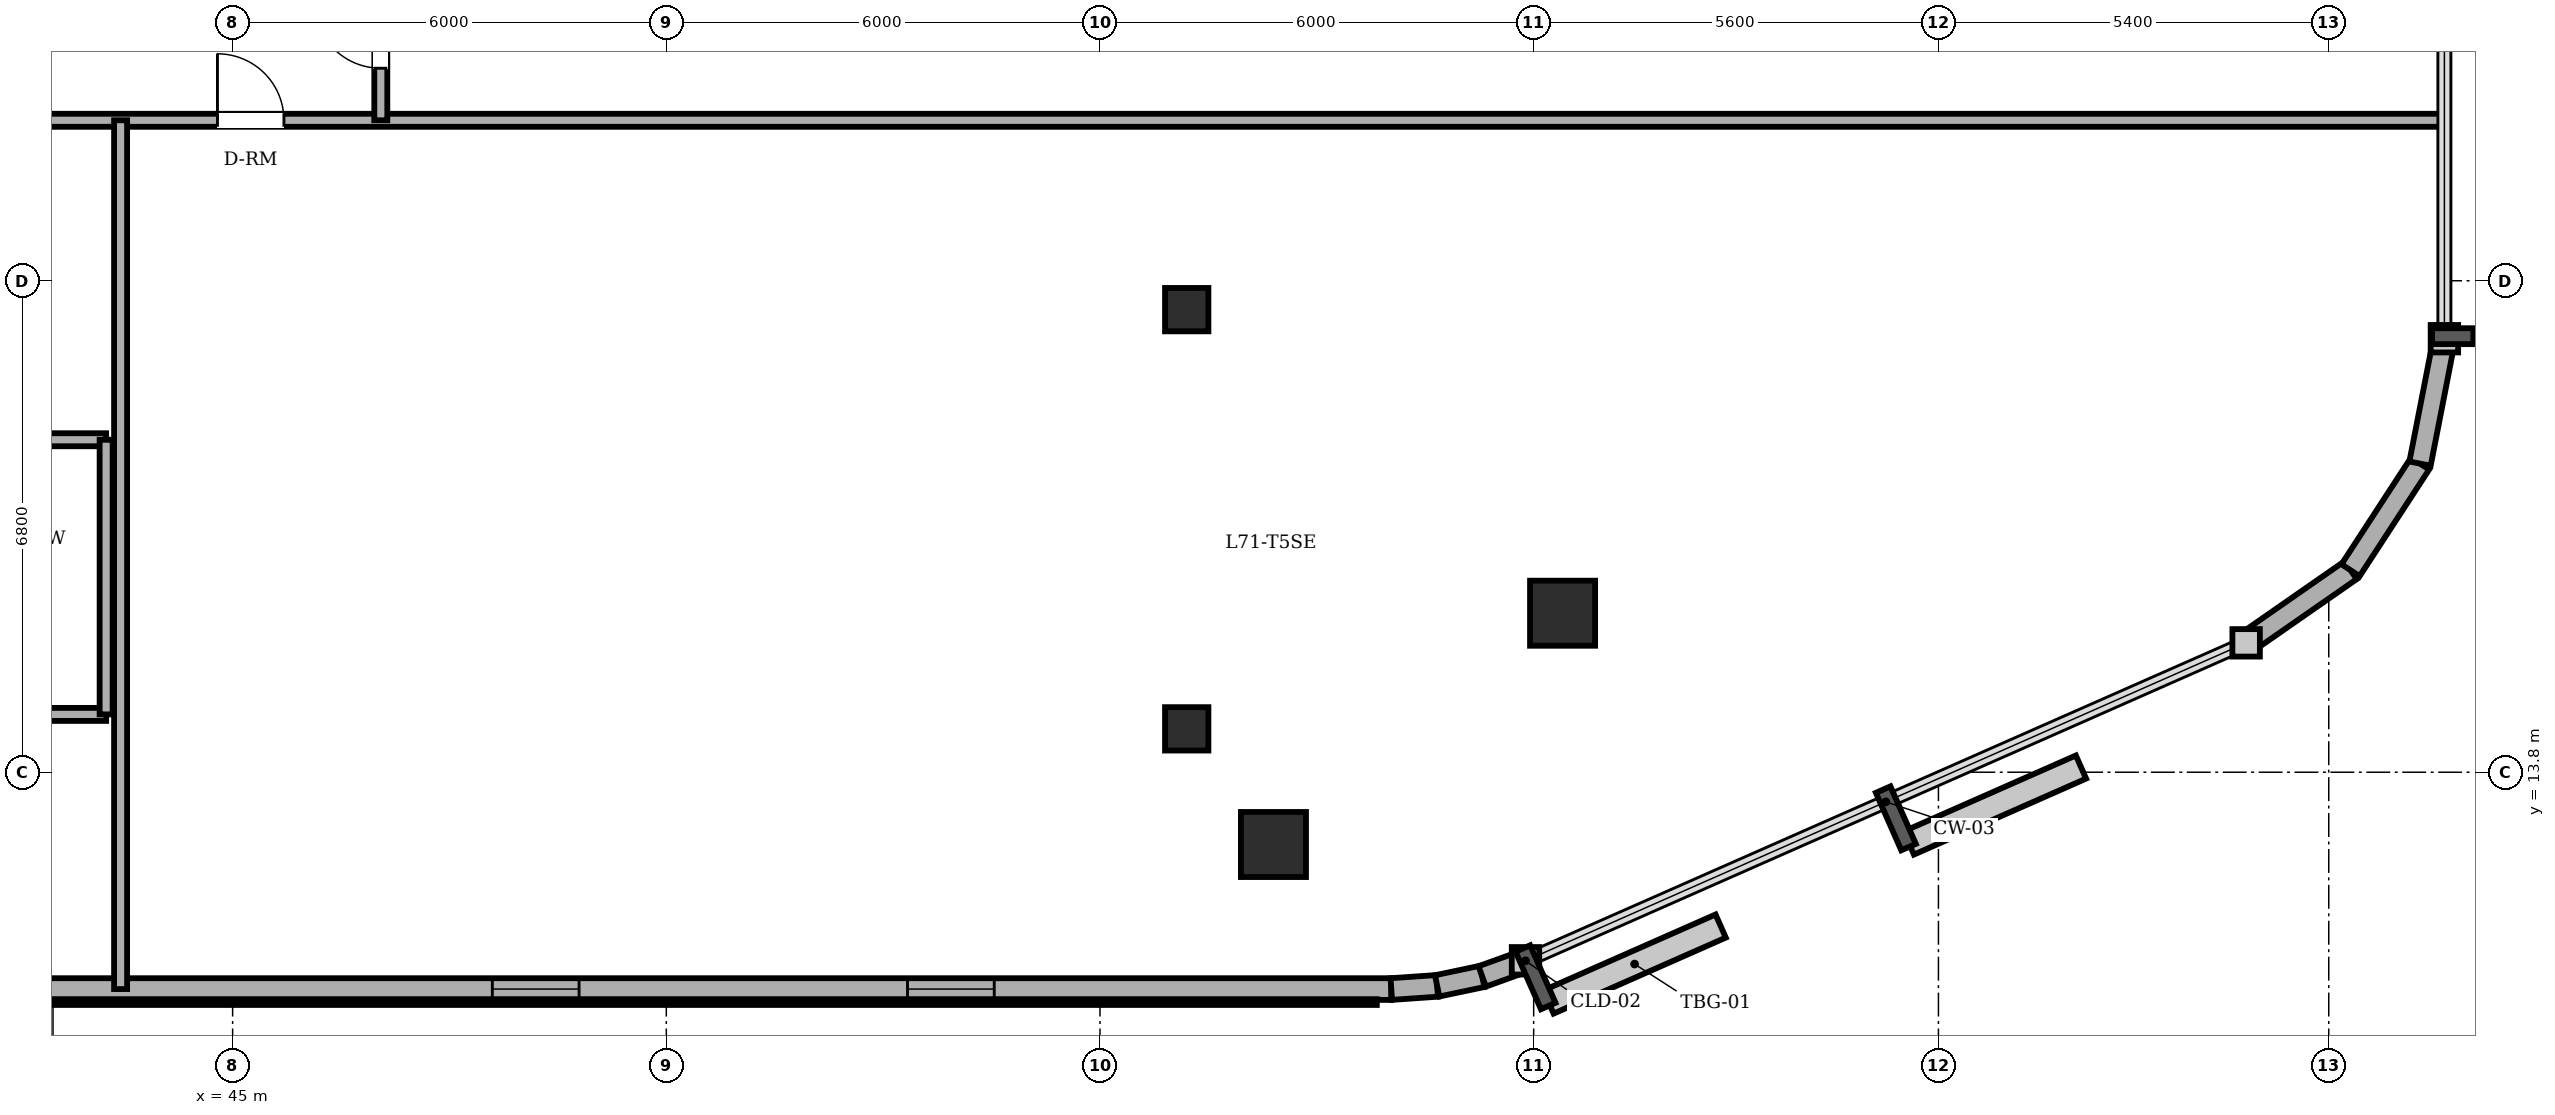
"""IFC4 building model, lengths in metres.
Left out: names, types, materials, properties, quantities, classifications, styles, units other than length and angle.
Written with IfcOpenShell. Run it as: python <this file> out.ifc"""

import sys

from ifc_helpers import new_model, si_unit, direction, frame, frame_2d, origin, origin_2d, place, context, subcontext, project, spatial, rectangle, circle, extrude, element, fill, save


model = new_model("IFC4")
c1 = context("Model", 3, precision=1e-05, world=origin(), true_north=direction((0.0, 1.0)))
c2 = subcontext(c1, "Body", "Model", "MODEL_VIEW")
j1 = project(units=[si_unit("LENGTHUNIT", "METRE"), si_unit("PLANEANGLEUNIT", "RADIAN")], contexts=[c1])
p1 = place(None, origin())
s1 = spatial("IfcSite", under=j1, at=p1, CompositionType="ELEMENT")
p2 = place(p1, origin())
s2 = spatial("IfcBuilding", under=s1, at=p2, CompositionType="ELEMENT")
p3 = place(p2, frame((0.0, 0.0, 273.4)))
s3 = spatial("IfcBuildingStorey", under=s2, at=p3, CompositionType="ELEMENT", Elevation=273.4)
for number, where, z_axis, x_axis in (
    (1, (59.4, 12.8, 0.0), (0.0, 0.0, 1.0), (1.0, 0.0, 0.0)),
    (2, (63.4, 16.0, 0.0), (0.0, 0.0, 1.0), (1.0, 0.0, 0.0)),
):
    element("IfcColumn", number, at=place(p3, frame(where, z_axis=z_axis, x_axis=x_axis)), inside=s3, PredefinedType="COLUMN", context=c2, shape_type="SweptSolid", body=[
        extrude(circle(Radius=0.45, at=origin_2d()), origin(), (0.0, 0.0, 1.0), 3.65),
    ])
for number, where, z_axis, x_axis in (
    (3, (58.2, 14.4, 0.0), (0.0, 0.0, 1.0), (1.0, 0.0, 0.0)),
    (4, (58.2, 20.2, 0.0), (0.0, 0.0, 1.0), (1.0, 0.0, 0.0)),
):
    element("IfcColumn", number, at=place(p3, frame(where, z_axis=z_axis, x_axis=x_axis)), inside=s3, PredefinedType="COLUMN", context=c2, shape_type="SweptSolid", body=[
        extrude(rectangle(XDim=0.6, YDim=0.6, at=origin_2d()), origin(), (0.0, 0.0, 1.0), 3.65),
    ])
p4 = place(p3, frame((24.0, 10.8, 0.0), z_axis=(0.0, 0.0, 1.0), x_axis=(1.0, 0.0, 0.0)))
e5 = element("IfcWall", 5, at=p4, inside=s3, PredefinedType="SOLIDWALL", context=c2, shape_type="SweptSolid", body=[
    extrude(rectangle(XDim=37.03, YDim=0.3, at=frame_2d((18.515, 0.0))), origin(), (0.0, 0.0, 1.0), 3.45),
])
p5 = place(p4, frame((5.05, 0.0, 0.0)))
e6 = element("IfcOpeningElement", 6, at=p5, cuts=e5, PredefinedType="OPENING", context=c2, shape_type="SweptSolid", body=[
    extrude(rectangle(XDim=0.95, YDim=2.2, at=frame_2d((0.475, 1.1))), frame((0.0, 0.16, 0.0), z_axis=(0.0, -1.0, 0.0), x_axis=(1.0, 0.0, 0.0)), (0.0, 0.0, 1.0), 0.32),
])
p6 = place(p4, frame((10.083, 0.0, 0.85)))
e7 = element("IfcOpeningElement", 7, at=p6, cuts=e5, PredefinedType="OPENING", context=c2, shape_type="SweptSolid", body=[
    extrude(rectangle(XDim=1.2, YDim=1.6, at=frame_2d((0.6, 0.8))), frame((0.0, 0.16, 0.0), z_axis=(0.0, -1.0, 0.0), x_axis=(1.0, 0.0, 0.0)), (0.0, 0.0, 1.0), 0.32),
])
p7 = place(p4, frame((17.05, 0.0, 0.85)))
e8 = element("IfcOpeningElement", 8, at=p7, cuts=e5, PredefinedType="OPENING", context=c2, shape_type="SweptSolid", body=[
    extrude(rectangle(XDim=1.2, YDim=1.6, at=frame_2d((0.6, 0.8))), frame((0.0, 0.16, 0.0), z_axis=(0.0, -1.0, 0.0), x_axis=(1.0, 0.0, 0.0)), (0.0, 0.0, 1.0), 0.32),
])
p8 = place(p4, frame((24.593, 0.0, 0.85)))
e9 = element("IfcOpeningElement", 9, at=p8, cuts=e5, PredefinedType="OPENING", context=c2, shape_type="SweptSolid", body=[
    extrude(rectangle(XDim=1.2, YDim=1.6, at=frame_2d((0.6, 0.8))), frame((0.0, 0.16, 0.0), z_axis=(0.0, -1.0, 0.0), x_axis=(1.0, 0.0, 0.0)), (0.0, 0.0, 1.0), 0.32),
])
p9 = place(p4, frame((30.337, 0.0, 0.85)))
e10 = element("IfcOpeningElement", 10, at=p9, cuts=e5, PredefinedType="OPENING", context=c2, shape_type="SweptSolid", body=[
    extrude(rectangle(XDim=1.2, YDim=1.6, at=frame_2d((0.6, 0.8))), frame((0.0, 0.16, 0.0), z_axis=(0.0, -1.0, 0.0), x_axis=(1.0, 0.0, 0.0)), (0.0, 0.0, 1.0), 0.32),
])
p10 = place(p3, frame((61.03, 10.8, 0.0), z_axis=(0.0, 0.0, 1.0), x_axis=(0.997613959688, 0.069039028352, 0.0)))
e11 = element("IfcWall", 11, at=p10, inside=s3, PredefinedType="SOLIDWALL", context=c2, shape_type="SweptSolid", body=[
    extrude(rectangle(XDim=0.636, YDim=0.3, at=frame_2d((0.318, 0.0))), origin(), (0.0, 0.0, 1.0), 3.45),
])
p11 = place(p3, frame((61.665, 10.844, 0.0), z_axis=(0.0, 0.0, 1.0), x_axis=(0.97857012251, 0.205913854149, 0.0)))
e12 = element("IfcWall", 12, at=p11, inside=s3, PredefinedType="SOLIDWALL", context=c2, shape_type="SweptSolid", body=[
    extrude(rectangle(XDim=0.637, YDim=0.3, at=frame_2d((0.318, 0.0))), origin(), (0.0, 0.0, 1.0), 3.45),
])
p12 = place(p3, frame((62.288, 10.975, 0.0), z_axis=(0.0, 0.0, 1.0), x_axis=(0.94077491148, 0.339031806665, 0.0)))
e13 = element("IfcWall", 13, at=p12, inside=s3, PredefinedType="SOLIDWALL", context=c2, shape_type="SweptSolid", body=[
    extrude(rectangle(XDim=0.636, YDim=0.3, at=frame_2d((0.318, 0.0))), origin(), (0.0, 0.0, 1.0), 3.45),
])
p13 = place(p3, frame((72.857, 15.59, 0.0), z_axis=(0.0, 0.0, 1.0), x_axis=(0.821006966142, 0.570918174124, 0.0)))
e14 = element("IfcWall", 14, at=p13, inside=s3, PredefinedType="SOLIDWALL", context=c2, shape_type="SweptSolid", body=[
    extrude(rectangle(XDim=1.76, YDim=0.3, at=frame_2d((0.88, 0.0))), origin(), (0.0, 0.0, 1.0), 3.45),
])
for number, where, z_axis, x_axis in (
    (15, (74.302, 16.595, 0.0), (0.0, 0.0, 1.0), (0.546, 0.838, 0.0)),
    (16, (75.263, 18.07, 0.0), (0.0, 0.0, 1.0), (0.192, 0.981, 0.0)),
):
    element("IfcWall", number, at=place(p3, frame(where, z_axis=z_axis, x_axis=x_axis)), inside=s3, PredefinedType="SOLIDWALL", context=c2, shape_type="SweptSolid", body=[
        extrude(rectangle(XDim=1.76, YDim=0.3, at=frame_2d((0.88, 0.0))), origin(), (0.0, 0.0, 1.0), 3.45),
    ])
p14 = place(p3, frame((39.85, 14.6, 0.0), z_axis=(0.0, 0.0, 1.0), x_axis=(1.0, 0.0, 0.0)))
e17 = element("IfcWall", 17, at=p14, inside=s3, PredefinedType="PARTITIONING", context=c2, shape_type="SweptSolid", body=[
    extrude(rectangle(XDim=3.4, YDim=0.18, at=frame_2d((1.7, 0.0))), origin(), (0.0, 0.0, 1.0), 3.092),
])
p15 = place(p3, frame((39.85, 18.4, 0.0), z_axis=(0.0, 0.0, 1.0), x_axis=(1.0, 0.0, 0.0)))
e18 = element("IfcWall", 18, at=p15, inside=s3, PredefinedType="PARTITIONING", context=c2, shape_type="SweptSolid", body=[
    extrude(rectangle(XDim=3.4, YDim=0.18, at=frame_2d((1.7, 0.0))), origin(), (0.0, 0.0, 1.0), 3.45),
])
p16 = place(p3, frame((39.85, 22.82, 0.0), z_axis=(0.0, 0.0, 1.0), x_axis=(1.0, 0.0, 0.0)))
e19 = element("IfcWall", 19, at=p16, inside=s3, PredefinedType="PARTITIONING", context=c2, shape_type="SweptSolid", body=[
    extrude(rectangle(XDim=35.75, YDim=0.18, at=frame_2d((17.875, 0.0))), origin(), (0.0, 0.0, 1.0), 3.45),
])
p17 = place(p16, frame((4.94, 0.0, 0.0)))
e20 = element("IfcOpeningElement", 20, at=p17, cuts=e19, PredefinedType="OPENING", context=c2, shape_type="SweptSolid", body=[
    extrude(rectangle(XDim=0.92, YDim=2.1, at=frame_2d((0.46, 1.05))), frame((0.0, 0.1, 0.0), z_axis=(0.0, -1.0, 0.0), x_axis=(1.0, 0.0, 0.0)), (0.0, 0.0, 1.0), 0.2),
])
p18 = place(p3, frame((43.25, 14.6, 0.0), z_axis=(0.0, 0.0, 1.0), x_axis=(0.0, 1.0, 0.0)))
e21 = element("IfcWall", 21, at=p18, inside=s3, PredefinedType="PARTITIONING", context=c2, shape_type="SweptSolid", body=[
    extrude(rectangle(XDim=3.8, YDim=0.18, at=frame_2d((1.9, 0.0))), origin(), (0.0, 0.0, 1.0), 3.45),
])
p19 = place(p3, frame((43.45, 10.8, 0.0), z_axis=(0.0, 0.0, 1.0), x_axis=(0.0, 1.0, 0.0)))
e22 = element("IfcWall", 22, at=p19, inside=s3, PredefinedType="PARTITIONING", context=c2, shape_type="SweptSolid", body=[
    extrude(rectangle(XDim=12.02, YDim=0.18, at=frame_2d((6.01, 0.0))), origin(), (0.0, 0.0, 1.0), 3.45),
])
p20 = place(p3, frame((47.05, 22.82, 0.0), z_axis=(0.0, 0.0, 1.0), x_axis=(0.0, 1.0, 0.0)))
e23 = element("IfcWall", 23, at=p20, inside=s3, PredefinedType="PARTITIONING", context=c2, shape_type="SweptSolid", body=[
    extrude(rectangle(XDim=2.36, YDim=0.18, at=frame_2d((1.18, 0.0))), origin(), (0.0, 0.0, 1.0), 3.45),
])
p21 = place(p20, frame((0.72, 0.0, 0.0)))
e24 = element("IfcOpeningElement", 24, at=p21, cuts=e23, PredefinedType="OPENING", context=c2, shape_type="SweptSolid", body=[
    extrude(rectangle(XDim=0.92, YDim=2.1, at=frame_2d((0.46, 1.05))), frame((0.0, 0.1, 0.0), z_axis=(0.0, -1.0, 0.0), x_axis=(1.0, 0.0, 0.0)), (0.0, 0.0, 1.0), 0.2),
])
p22 = place(p8, origin())
e25 = element("IfcWindow", 25, at=p22, inside=s3, PartitioningType="SINGLE_PANEL", PredefinedType="WINDOW", context=c2, shape_type="SweptSolid", body=[
    extrude(rectangle(XDim=1.2, YDim=1.6, at=frame_2d((0.6, 0.8))), frame((0.0, 0.03, 0.0), z_axis=(0.0, -1.0, 0.0), x_axis=(1.0, 0.0, 0.0)), (0.0, 0.0, 1.0), 0.06),
])
fill(e9, e25)
p23 = place(p9, origin())
e26 = element("IfcWindow", 26, at=p23, inside=s3, PartitioningType="SINGLE_PANEL", PredefinedType="WINDOW", context=c2, shape_type="SweptSolid", body=[
    extrude(rectangle(XDim=1.2, YDim=1.6, at=frame_2d((0.6, 0.8))), frame((0.0, 0.03, 0.0), z_axis=(0.0, -1.0, 0.0), x_axis=(1.0, 0.0, 0.0)), (0.0, 0.0, 1.0), 0.06),
])
fill(e10, e26)
p24 = place(p21, origin())
e27 = element("IfcDoor", 27, at=p24, inside=s3, OperationType="SINGLE_SWING_RIGHT", PredefinedType="DOOR", context=c2, shape_type="SweptSolid", body=[
    extrude(rectangle(XDim=0.92, YDim=2.1, at=frame_2d((0.46, 1.05))), frame((0.0, 0.025, 0.0), z_axis=(0.0, -1.0, 0.0), x_axis=(1.0, 0.0, 0.0)), (0.0, 0.0, 1.0), 0.05),
])
fill(e24, e27)
p25 = place(p17, origin())
e28 = element("IfcDoor", 28, at=p25, inside=s3, OperationType="SINGLE_SWING_LEFT", PredefinedType="DOOR", context=c2, shape_type="SweptSolid", body=[
    extrude(rectangle(XDim=0.92, YDim=2.1, at=frame_2d((0.46, 1.05))), frame((0.0, 0.025, 0.0), z_axis=(0.0, -1.0, 0.0), x_axis=(1.0, 0.0, 0.0)), (0.0, 0.0, 1.0), 0.05),
])
fill(e20, e28)
save(model, sys.argv[1])
